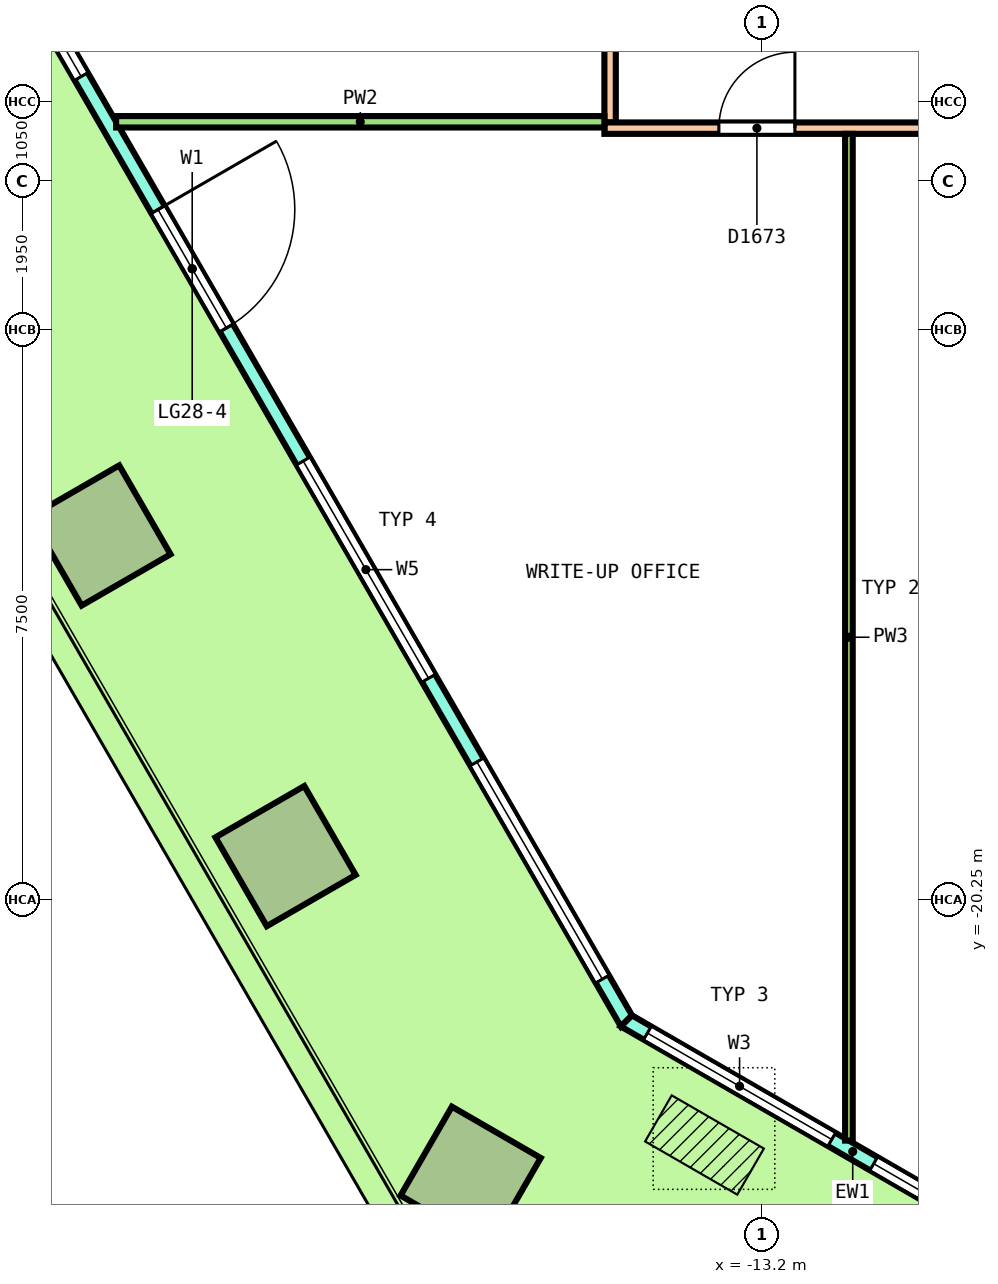
"""IFC4 building model, lengths in metres.
Left out: names, types, materials, properties, quantities, classifications, styles, units other than length and angle.
Written with IfcOpenShell. Run it as: python <this file> out.ifc"""

import sys

from ifc_helpers import new_model, si_unit, direction, frame, frame_2d, origin, origin_2d, place, context, subcontext, project, spatial, polyline, rectangle, outline, extrude, element, fill, save


model = new_model("IFC4")
c1 = context("Model", 3, precision=1e-05, world=origin(), true_north=direction((0.0, 1.0)))
c2 = subcontext(c1, "Body", "Model", "MODEL_VIEW")
j1 = project(units=[si_unit("LENGTHUNIT", "METRE"), si_unit("PLANEANGLEUNIT", "RADIAN")], contexts=[c1])
p1 = place(None, origin())
s1 = spatial("IfcSite", under=j1, at=p1, CompositionType="ELEMENT")
p2 = place(p1, origin())
s2 = spatial("IfcBuilding", under=s1, at=p2, CompositionType="ELEMENT")
p3 = place(p2, frame((0.0, 0.0, 130.8)))
s3 = spatial("IfcBuildingStorey", under=s2, at=p3, CompositionType="ELEMENT", Elevation=130.8)
p4 = place(p3, frame((-21.905, -15.459, 0.0), z_axis=(0.0, 0.0, 1.0), x_axis=(0.5, -0.866025403784, 0.0)))
e1 = element("IfcColumn", 1, at=p4, inside=s3, PredefinedType="COLUMN", context=c2, shape_type="SweptSolid", body=[
    extrude(rectangle(XDim=1.35, YDim=1.35, at=origin_2d()), origin(), (0.0, 0.0, 1.0), 4.05),
])
for number, where, z_axis, x_axis in (
    (2, (-19.47, -19.677, 0.0), (0.0, 0.0, 1.0), (0.5, -0.866, 0.0)),
    (3, (-17.035, -23.895, 0.0), (0.0, 0.0, 1.0), (0.866, -0.5, 0.0)),
):
    element("IfcColumn", number, at=place(p3, frame(where, z_axis=z_axis, x_axis=x_axis)), inside=s3, PredefinedType="COLUMN", context=c2, shape_type="SweptSolid", body=[
        extrude(rectangle(XDim=1.35, YDim=1.35, at=origin_2d()), origin(), (0.0, 0.0, 1.0), 4.04),
    ])
p5 = place(p3, frame((-26.411, -2.055, 0.0), z_axis=(0.0, 0.0, 1.0), x_axis=(0.50000204422, -0.86602422355, 0.0)))
e4 = element("IfcWall", 4, at=p5, inside=s3, PredefinedType="SOLIDWALL", context=c2, shape_type="SweptSolid", body=[
    extrude(outline(polyline([(-0.027, -0.1), (1.014, -0.1), (2.055, -0.1), (3.097, -0.1), (4.138, -0.1), (5.179, -0.1), (6.22, -0.1), (7.261, -0.1), (8.303, -0.1), (9.344, -0.1), (10.385, -0.1), (11.426, -0.1), (12.468, -0.1), (13.509, -0.1), (14.55, -0.1), (15.591, -0.1), (16.632, -0.1), (17.673, -0.1), (18.715, -0.1), (19.756, -0.1), (20.797, -0.1), (21.838, -0.1), (22.879, -0.1), (22.826, 0.1), (21.789, 0.1), (20.753, 0.1), (19.717, 0.1), (18.68, 0.1), (17.644, 0.1), (16.608, 0.1), (15.572, 0.1), (14.535, 0.1), (13.499, 0.1), (12.463, 0.1), (11.426, 0.1), (10.39, 0.1), (9.354, 0.1), (8.317, 0.1), (7.281, 0.1), (6.245, 0.1), (5.208, 0.1), (4.172, 0.1), (3.136, 0.1), (2.099, 0.1), (1.063, 0.1), (0.027, 0.1), (-0.027, -0.1)])), origin(), (0.0, 0.0, 1.0), 4.1),
])
p6 = place(p5, frame((0.635, 0.0, 0.1)))
e5 = element("IfcOpeningElement", 5, at=p6, cuts=e4, PredefinedType="OPENING", context=c2, shape_type="SweptSolid", body=[
    extrude(rectangle(XDim=3.3, YDim=2.9, at=frame_2d((1.65, 1.45))), frame((0.0, 0.11, 0.0), z_axis=(0.0, -1.0, 0.0), x_axis=(1.0, 0.0, 0.0)), (0.0, 0.0, 1.0), 0.22),
])
p7 = place(p5, frame((5.206, 0.0, 0.1)))
e6 = element("IfcOpeningElement", 6, at=p7, cuts=e4, PredefinedType="OPENING", context=c2, shape_type="SweptSolid", body=[
    extrude(rectangle(XDim=3.3, YDim=2.9, at=frame_2d((1.65, 1.45))), frame((0.0, 0.11, 0.0), z_axis=(0.0, -1.0, 0.0), x_axis=(1.0, 0.0, 0.0)), (0.0, 0.0, 1.0), 0.22),
])
p8 = place(p5, frame((10.526, 0.0, 0.0)))
e7 = element("IfcOpeningElement", 7, at=p8, cuts=e4, PredefinedType="OPENING", context=c2, shape_type="SweptSolid", body=[
    extrude(rectangle(XDim=1.8, YDim=2.4, at=frame_2d((0.9, 1.2))), frame((0.0, 0.11, 0.0), z_axis=(0.0, -1.0, 0.0), x_axis=(1.0, 0.0, 0.0)), (0.0, 0.0, 1.0), 0.22),
])
p9 = place(p5, frame((10.526, 0.0, 2.55)))
e8 = element("IfcOpeningElement", 8, at=p9, cuts=e4, PredefinedType="OPENING", context=c2, shape_type="SweptSolid", body=[
    extrude(rectangle(XDim=1.8, YDim=0.45, at=frame_2d((0.9, 0.225))), frame((0.0, 0.11, 0.0), z_axis=(0.0, -1.0, 0.0), x_axis=(1.0, 0.0, 0.0)), (0.0, 0.0, 1.0), 0.22),
])
p10 = place(p5, frame((14.347, 0.0, 0.1)))
e9 = element("IfcOpeningElement", 9, at=p10, cuts=e4, PredefinedType="OPENING", context=c2, shape_type="SweptSolid", body=[
    extrude(rectangle(XDim=3.3, YDim=2.9, at=frame_2d((1.65, 1.45))), frame((0.0, 0.11, 0.0), z_axis=(0.0, -1.0, 0.0), x_axis=(1.0, 0.0, 0.0)), (0.0, 0.0, 1.0), 0.22),
])
p11 = place(p5, frame((18.917, 0.0, 0.1)))
e10 = element("IfcOpeningElement", 10, at=p11, cuts=e4, PredefinedType="OPENING", context=c2, shape_type="SweptSolid", body=[
    extrude(rectangle(XDim=3.3, YDim=2.9, at=frame_2d((1.65, 1.45))), frame((0.0, 0.11, 0.0), z_axis=(0.0, -1.0, 0.0), x_axis=(1.0, 0.0, 0.0)), (0.0, 0.0, 1.0), 0.22),
])
p12 = place(p3, frame((-14.985, -21.845, 0.0), z_axis=(0.0, 0.0, 1.0), x_axis=(0.866029458321, -0.49999297727, 0.0)))
e11 = element("IfcWall", 11, at=p12, inside=s3, PredefinedType="SOLIDWALL", context=c2, shape_type="SweptSolid", body=[
    extrude(outline(polyline([(-0.027, -0.1), (1.128, -0.1), (2.282, -0.1), (3.437, -0.1), (4.592, -0.1), (5.747, -0.1), (6.901, -0.1), (6.848, 0.1), (5.711, 0.1), (4.574, 0.1), (3.437, 0.1), (2.301, 0.1), (1.164, 0.1), (0.027, 0.1), (-0.027, -0.1)])), origin(), (0.0, 0.0, 1.0), 4.1),
])
p13 = place(p12, frame((0.319, 0.0, 0.1)))
e12 = element("IfcOpeningElement", 12, at=p13, cuts=e11, PredefinedType="OPENING", context=c2, shape_type="SweptSolid", body=[
    extrude(rectangle(XDim=2.8, YDim=2.9, at=frame_2d((1.4, 1.45))), frame((0.0, 0.11, 0.0), z_axis=(0.0, -1.0, 0.0), x_axis=(1.0, 0.0, 0.0)), (0.0, 0.0, 1.0), 0.22),
])
p14 = place(p12, frame((3.756, 0.0, 0.1)))
e13 = element("IfcOpeningElement", 13, at=p14, cuts=e11, PredefinedType="OPENING", context=c2, shape_type="SweptSolid", body=[
    extrude(rectangle(XDim=2.8, YDim=2.9, at=frame_2d((1.4, 1.45))), frame((0.0, 0.11, 0.0), z_axis=(0.0, -1.0, 0.0), x_axis=(1.0, 0.0, 0.0)), (0.0, 0.0, 1.0), 0.22),
])
p15 = place(p3, frame((-15.2, -10.025, 0.0), z_axis=(0.0, 0.0, 1.0), x_axis=(0.0, 1.0, 0.0)))
e14 = element("IfcWall", 14, at=p15, inside=s3, PredefinedType="PARTITIONING", context=c2, shape_type="SweptSolid", body=[
    extrude(rectangle(XDim=8.901, YDim=0.15, at=frame_2d((4.45, 0.0))), origin(), (0.0, 0.0, 1.0), 3.05),
])
p16 = place(p3, frame((-15.275, -10.1, 0.0), z_axis=(0.0, 0.0, 1.0), x_axis=(1.0, 0.0, 0.0)))
e15 = element("IfcWall", 15, at=p16, inside=s3, PredefinedType="PARTITIONING", context=c2, shape_type="SweptSolid", body=[
    extrude(rectangle(XDim=30.4, YDim=0.15, at=frame_2d((15.2, 0.0))), origin(), (0.0, 0.0, 1.0), 3.05),
])
p17 = place(p16, frame((1.506, 0.0, 0.0)))
e16 = element("IfcOpeningElement", 16, at=p17, cuts=e15, PredefinedType="OPENING", context=c2, shape_type="SweptSolid", body=[
    extrude(rectangle(XDim=1.0, YDim=2.1, at=frame_2d((0.5, 1.05))), frame((0.0, 0.085, 0.0), z_axis=(0.0, -1.0, 0.0), x_axis=(1.0, 0.0, 0.0)), (0.0, 0.0, 1.0), 0.17),
])
p18 = place(p16, frame((7.84, 0.0, 0.0)))
e17 = element("IfcOpeningElement", 17, at=p18, cuts=e15, PredefinedType="OPENING", context=c2, shape_type="SweptSolid", body=[
    extrude(rectangle(XDim=1.0, YDim=2.1, at=frame_2d((0.5, 1.05))), frame((0.0, 0.085, 0.0), z_axis=(0.0, -1.0, 0.0), x_axis=(1.0, 0.0, 0.0)), (0.0, 0.0, 1.0), 0.17),
])
p19 = place(p16, frame((15.685, 0.0, 0.0)))
e18 = element("IfcOpeningElement", 18, at=p19, cuts=e15, PredefinedType="OPENING", context=c2, shape_type="SweptSolid", body=[
    extrude(rectangle(XDim=1.2, YDim=2.1, at=frame_2d((0.6, 1.05))), frame((0.0, 0.085, 0.0), z_axis=(0.0, -1.0, 0.0), x_axis=(1.0, 0.0, 0.0)), (0.0, 0.0, 1.0), 0.17),
])
p20 = place(p16, frame((23.812, 0.0, 0.0)))
e19 = element("IfcOpeningElement", 19, at=p20, cuts=e15, PredefinedType="OPENING", context=c2, shape_type="SweptSolid", body=[
    extrude(rectangle(XDim=1.2, YDim=2.1, at=frame_2d((0.6, 1.05))), frame((0.0, 0.085, 0.0), z_axis=(0.0, -1.0, 0.0), x_axis=(1.0, 0.0, 0.0)), (0.0, 0.0, 1.0), 0.17),
])
p21 = place(p3, frame((-21.699, -10.016, 0.0), z_axis=(0.0, 0.0, 1.0), x_axis=(1.0, 0.0, 0.0)))
e20 = element("IfcWall", 20, at=p21, inside=s3, PredefinedType="PARTITIONING", context=c2, shape_type="SweptSolid", body=[
    extrude(rectangle(XDim=6.424, YDim=0.15, at=frame_2d((3.212, 0.0))), origin(), (0.0, 0.0, 1.0), 3.05),
])
p22 = place(p3, frame((-12.058, -23.42, 0.0), z_axis=(0.0, 0.0, 1.0), x_axis=(0.0, 1.0, 0.0)))
e21 = element("IfcWall", 21, at=p22, inside=s3, PredefinedType="PARTITIONING", context=c2, shape_type="SweptSolid", body=[
    extrude(rectangle(XDim=13.245, YDim=0.1, at=frame_2d((6.623, 0.0))), origin(), (0.0, 0.0, 1.0), 3.05),
])
p23 = place(p7, origin())
e22 = element("IfcWindow", 22, at=p23, inside=s3, PartitioningType="SINGLE_PANEL", PredefinedType="WINDOW", context=c2, shape_type="SweptSolid", body=[
    extrude(rectangle(XDim=3.3, YDim=2.9, at=frame_2d((1.65, 1.45))), frame((0.0, 0.03, 0.0), z_axis=(0.0, -1.0, 0.0), x_axis=(1.0, 0.0, 0.0)), (0.0, 0.0, 1.0), 0.06),
])
fill(e6, e22)
p24 = place(p8, origin())
e23 = element("IfcDoor", 23, at=p24, inside=s3, OperationType="DOUBLE_DOOR_SINGLE_SWING", PredefinedType="DOOR", context=c2, shape_type="SweptSolid", body=[
    extrude(rectangle(XDim=1.8, YDim=2.4, at=frame_2d((0.9, 1.2))), frame((0.0, 0.025, 0.0), z_axis=(0.0, -1.0, 0.0), x_axis=(1.0, 0.0, 0.0)), (0.0, 0.0, 1.0), 0.05),
])
fill(e7, e23)
p25 = place(p9, origin())
e24 = element("IfcWindow", 24, at=p25, inside=s3, PartitioningType="SINGLE_PANEL", PredefinedType="WINDOW", context=c2, shape_type="SweptSolid", body=[
    extrude(rectangle(XDim=1.8, YDim=0.45, at=frame_2d((0.9, 0.225))), frame((0.0, 0.03, 0.0), z_axis=(0.0, -1.0, 0.0), x_axis=(1.0, 0.0, 0.0)), (0.0, 0.0, 1.0), 0.06),
])
fill(e8, e24)
p26 = place(p10, origin())
e25 = element("IfcWindow", 25, at=p26, inside=s3, PartitioningType="SINGLE_PANEL", PredefinedType="WINDOW", context=c2, shape_type="SweptSolid", body=[
    extrude(rectangle(XDim=3.3, YDim=2.9, at=frame_2d((1.65, 1.45))), frame((0.0, 0.03, 0.0), z_axis=(0.0, -1.0, 0.0), x_axis=(1.0, 0.0, 0.0)), (0.0, 0.0, 1.0), 0.06),
])
fill(e9, e25)
p27 = place(p11, origin())
e26 = element("IfcWindow", 26, at=p27, inside=s3, PartitioningType="SINGLE_PANEL", PredefinedType="WINDOW", context=c2, shape_type="SweptSolid", body=[
    extrude(rectangle(XDim=3.3, YDim=2.9, at=frame_2d((1.65, 1.45))), frame((0.0, 0.03, 0.0), z_axis=(0.0, -1.0, 0.0), x_axis=(1.0, 0.0, 0.0)), (0.0, 0.0, 1.0), 0.06),
])
fill(e10, e26)
p28 = place(p13, origin())
e27 = element("IfcWindow", 27, at=p28, inside=s3, PartitioningType="SINGLE_PANEL", PredefinedType="WINDOW", context=c2, shape_type="SweptSolid", body=[
    extrude(rectangle(XDim=2.8, YDim=2.9, at=frame_2d((1.4, 1.45))), frame((0.0, 0.03, 0.0), z_axis=(0.0, -1.0, 0.0), x_axis=(1.0, 0.0, 0.0)), (0.0, 0.0, 1.0), 0.06),
])
fill(e12, e27)
p29 = place(p14, origin())
e28 = element("IfcWindow", 28, at=p29, inside=s3, PartitioningType="SINGLE_PANEL", PredefinedType="WINDOW", context=c2, shape_type="SweptSolid", body=[
    extrude(rectangle(XDim=2.8, YDim=2.9, at=frame_2d((1.4, 1.45))), frame((0.0, 0.03, 0.0), z_axis=(0.0, -1.0, 0.0), x_axis=(1.0, 0.0, 0.0)), (0.0, 0.0, 1.0), 0.06),
])
fill(e13, e28)
p30 = place(p17, origin())
e29 = element("IfcDoor", 29, at=p30, inside=s3, OperationType="SINGLE_SWING_RIGHT", PredefinedType="DOOR", context=c2, shape_type="SweptSolid", body=[
    extrude(rectangle(XDim=1.0, YDim=2.1, at=frame_2d((0.5, 1.05))), frame((0.0, 0.025, 0.0), z_axis=(0.0, -1.0, 0.0), x_axis=(1.0, 0.0, 0.0)), (0.0, 0.0, 1.0), 0.05),
])
fill(e16, e29)
save(model, sys.argv[1])
